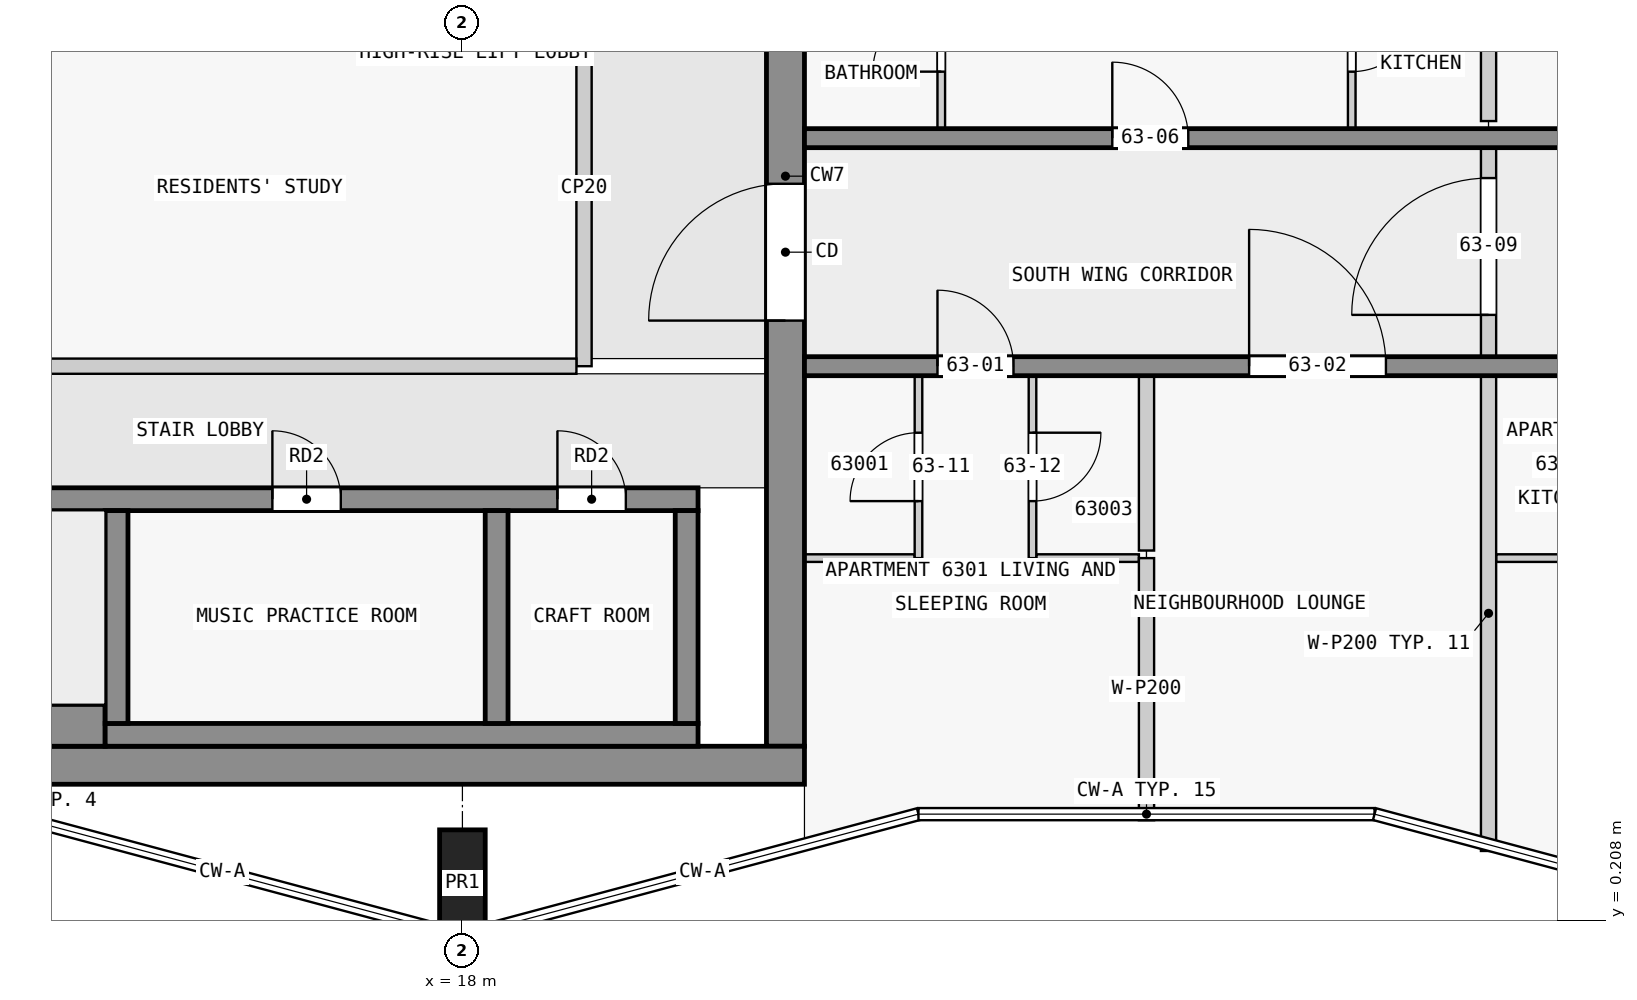
"""IFC4 building model, lengths in metres.
Left out: names, types, materials, properties, quantities, classifications, styles, units other than length and angle.
Written with IfcOpenShell. Run it as: python <this file> out.ifc"""

import sys

from ifc_helpers import new_model, si_unit, direction, frame, frame_2d, origin, origin_2d, place, context, subcontext, project, spatial, rectangle, extrude, element, fill, save


model = new_model("IFC4")
c1 = context("Model", 3, precision=1e-05, world=origin(), true_north=direction((0.0, 1.0)))
c2 = subcontext(c1, "Body", "Model", "MODEL_VIEW")
j1 = project(units=[si_unit("LENGTHUNIT", "METRE"), si_unit("PLANEANGLEUNIT", "RADIAN")], contexts=[c1])
p1 = place(None, origin())
s1 = spatial("IfcSite", under=j1, at=p1, CompositionType="ELEMENT")
p2 = place(p1, origin())
s2 = spatial("IfcBuilding", under=s1, at=p2, CompositionType="ELEMENT")
p3 = place(p2, frame((0.0, 0.0, 242.4)))
s3 = spatial("IfcBuildingStorey", under=s2, at=p3, CompositionType="ELEMENT", Elevation=242.4)
p4 = place(p3, frame((18.0, 0.7, 0.0), z_axis=(0.0, 0.0, 1.0), x_axis=(1.0, 0.0, 0.0)))
e1 = element("IfcColumn", 1, at=p4, inside=s3, PredefinedType="COLUMN", context=c2, shape_type="SweptSolid", body=[
    extrude(rectangle(XDim=0.6, YDim=1.4, at=origin_2d()), origin(), (0.0, 0.0, 1.0), 3.5),
])
p5 = place(p3, frame((1.8, 2.25, 0.0), z_axis=(0.0, 0.0, 1.0), x_axis=(1.0, 0.0, 0.0)))
e2 = element("IfcWall", 2, at=p5, inside=s3, PredefinedType="SHEAR", context=c2, shape_type="SweptSolid", body=[
    extrude(rectangle(XDim=20.7, YDim=0.5, at=frame_2d((10.35, 0.0))), origin(), (0.0, 0.0, 1.0), 3.25),
])
p6 = place(p3, frame((22.25, 2.5, 0.0), z_axis=(0.0, 0.0, 1.0), x_axis=(0.0, 1.0, 0.0)))
e3 = element("IfcWall", 3, at=p6, inside=s3, PredefinedType="SHEAR", context=c2, shape_type="SweptSolid", body=[
    extrude(rectangle(XDim=15.0, YDim=0.5, at=frame_2d((7.5, 0.0))), origin(), (0.0, 0.0, 1.0), 3.25),
])
p7 = place(p6, frame((5.6, 0.0, 0.0)))
e4 = element("IfcOpeningElement", 4, at=p7, cuts=e3, PredefinedType="OPENING", context=c2, shape_type="SweptSolid", body=[
    extrude(rectangle(XDim=1.8, YDim=2.1, at=frame_2d((0.9, 1.05))), frame((0.0, 0.26, 0.0), z_axis=(0.0, -1.0, 0.0), x_axis=(1.0, 0.0, 0.0)), (0.0, 0.0, 1.0), 0.52),
])
p8 = place(p3, frame((6.9, 2.775, 0.0), z_axis=(0.0, 0.0, 1.0), x_axis=(1.0, 0.0, 0.0)))
e5 = element("IfcWall", 5, at=p8, inside=s3, PredefinedType="SHEAR", context=c2, shape_type="SweptSolid", body=[
    extrude(rectangle(XDim=6.4, YDim=0.55, at=frame_2d((3.2, 0.0))), origin(), (0.0, 0.0, 1.0), 3.25),
])
p9 = place(p3, frame((13.3, 2.65, 0.0), z_axis=(0.0, 0.0, 1.0), x_axis=(1.0, 0.0, 0.0)))
e6 = element("IfcWall", 6, at=p9, inside=s3, PredefinedType="SHEAR", context=c2, shape_type="SweptSolid", body=[
    extrude(rectangle(XDim=7.8, YDim=0.3, at=frame_2d((3.9, 0.0))), origin(), (0.0, 0.0, 1.0), 3.25),
])
for number, where, z_axis, x_axis in (
    (7, (13.45, 2.8, 0.0), (0.0, 0.0, 1.0), (0.0, 1.0, 0.0)),
    (8, (18.45, 2.8, 0.0), (0.0, 0.0, 1.0), (0.0, 1.0, 0.0)),
    (9, (20.95, 2.8, 0.0), (0.0, 0.0, 1.0), (0.0, 1.0, 0.0)),
):
    element("IfcWall", number, at=place(p3, frame(where, z_axis=z_axis, x_axis=x_axis)), inside=s3, PredefinedType="SHEAR", context=c2, shape_type="SweptSolid", body=[
        extrude(rectangle(XDim=2.8, YDim=0.3, at=frame_2d((1.4, 0.0))), origin(), (0.0, 0.0, 1.0), 3.25),
    ])
p10 = place(p3, frame((2.3, 5.75, 0.0), z_axis=(0.0, 0.0, 1.0), x_axis=(1.0, 0.0, 0.0)))
e10 = element("IfcWall", 10, at=p10, inside=s3, PredefinedType="SHEAR", context=c2, shape_type="SweptSolid", body=[
    extrude(rectangle(XDim=18.8, YDim=0.3, at=frame_2d((9.4, 0.0))), origin(), (0.0, 0.0, 1.0), 3.25),
])
p11 = place(p10, frame((4.65, 0.0, 0.0)))
e11 = element("IfcOpeningElement", 11, at=p11, cuts=e10, PredefinedType="OPENING", context=c2, shape_type="SweptSolid", body=[
    extrude(rectangle(XDim=1.1, YDim=2.1, at=frame_2d((0.55, 1.05))), frame((0.0, 0.16, 0.0), z_axis=(0.0, -1.0, 0.0), x_axis=(1.0, 0.0, 0.0)), (0.0, 0.0, 1.0), 0.32),
])
p12 = place(p10, frame((0.45, 0.0, 0.0)))
e12 = element("IfcOpeningElement", 12, at=p12, cuts=e10, PredefinedType="OPENING", context=c2, shape_type="SweptSolid", body=[
    extrude(rectangle(XDim=1.1, YDim=2.1, at=frame_2d((0.55, 1.05))), frame((0.0, 0.16, 0.0), z_axis=(0.0, -1.0, 0.0), x_axis=(1.0, 0.0, 0.0)), (0.0, 0.0, 1.0), 0.32),
])
p13 = place(p10, frame((2.75, 0.0, 0.0)))
e13 = element("IfcOpeningElement", 13, at=p13, cuts=e10, PredefinedType="OPENING", context=c2, shape_type="SweptSolid", body=[
    extrude(rectangle(XDim=1.1, YDim=2.1, at=frame_2d((0.55, 1.05))), frame((0.0, 0.16, 0.0), z_axis=(0.0, -1.0, 0.0), x_axis=(1.0, 0.0, 0.0)), (0.0, 0.0, 1.0), 0.32),
])
p14 = place(p10, frame((13.2, 0.0, 0.0)))
e14 = element("IfcOpeningElement", 14, at=p14, cuts=e10, PredefinedType="OPENING", context=c2, shape_type="SweptSolid", body=[
    extrude(rectangle(XDim=0.9, YDim=2.1, at=frame_2d((0.45, 1.05))), frame((0.0, 0.16, 0.0), z_axis=(0.0, -1.0, 0.0), x_axis=(1.0, 0.0, 0.0)), (0.0, 0.0, 1.0), 0.32),
])
p15 = place(p10, frame((16.95, 0.0, 0.0)))
e15 = element("IfcOpeningElement", 15, at=p15, cuts=e10, PredefinedType="OPENING", context=c2, shape_type="SweptSolid", body=[
    extrude(rectangle(XDim=0.9, YDim=2.1, at=frame_2d((0.45, 1.05))), frame((0.0, 0.16, 0.0), z_axis=(0.0, -1.0, 0.0), x_axis=(1.0, 0.0, 0.0)), (0.0, 0.0, 1.0), 0.32),
])
p16 = place(p3, frame((22.5, 7.5, 0.0), z_axis=(0.0, 0.0, 1.0), x_axis=(1.0, 0.0, 0.0)))
e16 = element("IfcWall", 16, at=p16, inside=s3, PredefinedType="SHEAR", context=c2, shape_type="SweptSolid", body=[
    extrude(rectangle(XDim=22.5, YDim=0.25, at=frame_2d((11.25, 0.0))), origin(), (0.0, 0.0, 1.0), 3.25),
])
p17 = place(p16, frame((1.75, 0.0, 0.0)))
e17 = element("IfcOpeningElement", 17, at=p17, cuts=e16, PredefinedType="OPENING", context=c2, shape_type="SweptSolid", body=[
    extrude(rectangle(XDim=1.0, YDim=2.1, at=frame_2d((0.5, 1.05))), frame((0.0, 0.135, 0.0), z_axis=(0.0, -1.0, 0.0), x_axis=(1.0, 0.0, 0.0)), (0.0, 0.0, 1.0), 0.27),
])
p18 = place(p16, frame((5.85, 0.0, 0.0)))
e18 = element("IfcOpeningElement", 18, at=p18, cuts=e16, PredefinedType="OPENING", context=c2, shape_type="SweptSolid", body=[
    extrude(rectangle(XDim=1.8, YDim=2.1, at=frame_2d((0.9, 1.05))), frame((0.0, 0.135, 0.0), z_axis=(0.0, -1.0, 0.0), x_axis=(1.0, 0.0, 0.0)), (0.0, 0.0, 1.0), 0.27),
])
p19 = place(p16, frame((13.05, 0.0, 0.0)))
e19 = element("IfcOpeningElement", 19, at=p19, cuts=e16, PredefinedType="OPENING", context=c2, shape_type="SweptSolid", body=[
    extrude(rectangle(XDim=1.0, YDim=2.1, at=frame_2d((0.5, 1.05))), frame((0.0, 0.135, 0.0), z_axis=(0.0, -1.0, 0.0), x_axis=(1.0, 0.0, 0.0)), (0.0, 0.0, 1.0), 0.27),
])
p20 = place(p16, frame((18.75, 0.0, 0.0)))
e20 = element("IfcOpeningElement", 20, at=p20, cuts=e16, PredefinedType="OPENING", context=c2, shape_type="SweptSolid", body=[
    extrude(rectangle(XDim=0.9, YDim=2.1, at=frame_2d((0.45, 1.05))), frame((0.0, 0.135, 0.0), z_axis=(0.0, -1.0, 0.0), x_axis=(1.0, 0.0, 0.0)), (0.0, 0.0, 1.0), 0.27),
])
p21 = place(p16, frame((20.95, 0.0, 0.0)))
e21 = element("IfcOpeningElement", 21, at=p21, cuts=e16, PredefinedType="OPENING", context=c2, shape_type="SweptSolid", body=[
    extrude(rectangle(XDim=1.0, YDim=2.1, at=frame_2d((0.5, 1.05))), frame((0.0, 0.135, 0.0), z_axis=(0.0, -1.0, 0.0), x_axis=(1.0, 0.0, 0.0)), (0.0, 0.0, 1.0), 0.27),
])
p22 = place(p3, frame((22.5, 10.5, 0.0), z_axis=(0.0, 0.0, 1.0), x_axis=(1.0, 0.0, 0.0)))
e22 = element("IfcWall", 22, at=p22, inside=s3, PredefinedType="SHEAR", context=c2, shape_type="SweptSolid", body=[
    extrude(rectangle(XDim=22.5, YDim=0.25, at=frame_2d((11.25, 0.0))), origin(), (0.0, 0.0, 1.0), 3.25),
])
p23 = place(p22, frame((4.05, 0.0, 0.0)))
e23 = element("IfcOpeningElement", 23, at=p23, cuts=e22, PredefinedType="OPENING", context=c2, shape_type="SweptSolid", body=[
    extrude(rectangle(XDim=1.0, YDim=2.1, at=frame_2d((0.5, 1.05))), frame((0.0, 0.135, 0.0), z_axis=(0.0, -1.0, 0.0), x_axis=(1.0, 0.0, 0.0)), (0.0, 0.0, 1.0), 0.27),
])
p24 = place(p22, frame((10.75, 0.0, 0.0)))
e24 = element("IfcOpeningElement", 24, at=p24, cuts=e22, PredefinedType="OPENING", context=c2, shape_type="SweptSolid", body=[
    extrude(rectangle(XDim=1.0, YDim=2.1, at=frame_2d((0.5, 1.05))), frame((0.0, 0.135, 0.0), z_axis=(0.0, -1.0, 0.0), x_axis=(1.0, 0.0, 0.0)), (0.0, 0.0, 1.0), 0.27),
])
p25 = place(p22, frame((16.85, 0.0, 0.0)))
e25 = element("IfcOpeningElement", 25, at=p25, cuts=e22, PredefinedType="OPENING", context=c2, shape_type="SweptSolid", body=[
    extrude(rectangle(XDim=1.0, YDim=2.1, at=frame_2d((0.5, 1.05))), frame((0.0, 0.135, 0.0), z_axis=(0.0, -1.0, 0.0), x_axis=(1.0, 0.0, 0.0)), (0.0, 0.0, 1.0), 0.27),
])
p26 = place(p3, frame((10.9, 7.5, 0.0), z_axis=(0.0, 0.0, 1.0), x_axis=(1.0, 0.0, 0.0)))
e26 = element("IfcWall", 26, at=p26, inside=s3, PredefinedType="PARTITIONING", context=c2, shape_type="SweptSolid", body=[
    extrude(rectangle(XDim=8.6, YDim=0.2, at=frame_2d((4.3, 0.0))), origin(), (0.0, 0.0, 1.0), 3.25),
])
p27 = place(p3, frame((19.6, 7.5, 0.0), z_axis=(0.0, 0.0, 1.0), x_axis=(0.0, 1.0, 0.0)))
e27 = element("IfcWall", 27, at=p27, inside=s3, PredefinedType="PARTITIONING", context=c2, shape_type="SweptSolid", body=[
    extrude(rectangle(XDim=4.7, YDim=0.2, at=frame_2d((2.35, 0.0))), origin(), (0.0, 0.0, 1.0), 3.25),
])
p28 = place(p3, frame((22.5, 4.975, 0.0), z_axis=(0.0, 0.0, 1.0), x_axis=(1.0, 0.0, 0.0)))
e28 = element("IfcWall", 28, at=p28, inside=s3, PredefinedType="PARTITIONING", context=c2, shape_type="SweptSolid", body=[
    extrude(rectangle(XDim=1.45, YDim=0.1, at=frame_2d((0.725, 0.0))), origin(), (0.0, 0.0, 1.0), 3.25),
])
p29 = place(p3, frame((25.55, 4.975, 0.0), z_axis=(0.0, 0.0, 1.0), x_axis=(1.0, 0.0, 0.0)))
e29 = element("IfcWall", 29, at=p29, inside=s3, PredefinedType="PARTITIONING", context=c2, shape_type="SweptSolid", body=[
    extrude(rectangle(XDim=1.35, YDim=0.1, at=frame_2d((0.675, 0.0))), origin(), (0.0, 0.0, 1.0), 3.25),
])
p30 = place(p3, frame((31.6, 4.975, 0.0), z_axis=(0.0, 0.0, 1.0), x_axis=(1.0, 0.0, 0.0)))
e30 = element("IfcWall", 30, at=p30, inside=s3, PredefinedType="PARTITIONING", context=c2, shape_type="SweptSolid", body=[
    extrude(rectangle(XDim=1.65, YDim=0.1, at=frame_2d((0.825, 0.0))), origin(), (0.0, 0.0, 1.0), 3.25),
])
p31 = place(p3, frame((24.0, 4.975, 0.0), z_axis=(0.0, 0.0, 1.0), x_axis=(0.0, 1.0, 0.0)))
e31 = element("IfcWall", 31, at=p31, inside=s3, PredefinedType="PARTITIONING", context=c2, shape_type="SweptSolid", body=[
    extrude(rectangle(XDim=2.4, YDim=0.1, at=frame_2d((1.2, 0.0))), origin(), (0.0, 0.0, 1.0), 3.25),
])
p32 = place(p31, frame((0.75, 0.0, 0.0)))
e32 = element("IfcOpeningElement", 32, at=p32, cuts=e31, PredefinedType="OPENING", context=c2, shape_type="SweptSolid", body=[
    extrude(rectangle(XDim=0.9, YDim=2.1, at=frame_2d((0.45, 1.05))), frame((0.0, 0.06, 0.0), z_axis=(0.0, -1.0, 0.0), x_axis=(1.0, 0.0, 0.0)), (0.0, 0.0, 1.0), 0.12),
])
p33 = place(p3, frame((24.3, 10.625, 0.0), z_axis=(0.0, 0.0, 1.0), x_axis=(0.0, 1.0, 0.0)))
e33 = element("IfcWall", 33, at=p33, inside=s3, PredefinedType="PARTITIONING", context=c2, shape_type="SweptSolid", body=[
    extrude(rectangle(XDim=2.35, YDim=0.1, at=frame_2d((1.175, 0.0))), origin(), (0.0, 0.0, 1.0), 3.25),
])
p34 = place(p33, frame((0.75, 0.0, 0.0)))
e34 = element("IfcOpeningElement", 34, at=p34, cuts=e33, PredefinedType="OPENING", context=c2, shape_type="SweptSolid", body=[
    extrude(rectangle(XDim=0.9, YDim=2.1, at=frame_2d((0.45, 1.05))), frame((0.0, 0.06, 0.0), z_axis=(0.0, -1.0, 0.0), x_axis=(1.0, 0.0, 0.0)), (0.0, 0.0, 1.0), 0.12),
])
p35 = place(p3, frame((25.5, 7.375, 0.0), z_axis=(0.0, 0.0, 1.0), x_axis=(0.0, -1.0, 0.0)))
e35 = element("IfcWall", 35, at=p35, inside=s3, PredefinedType="PARTITIONING", context=c2, shape_type="SweptSolid", body=[
    extrude(rectangle(XDim=2.4, YDim=0.1, at=frame_2d((1.2, 0.0))), origin(), (0.0, 0.0, 1.0), 3.25),
])
p36 = place(p35, frame((0.75, 0.0, 0.0)))
e36 = element("IfcOpeningElement", 36, at=p36, cuts=e35, PredefinedType="OPENING", context=c2, shape_type="SweptSolid", body=[
    extrude(rectangle(XDim=0.9, YDim=2.1, at=frame_2d((0.45, 1.05))), frame((0.0, 0.06, 0.0), z_axis=(0.0, -1.0, 0.0), x_axis=(1.0, 0.0, 0.0)), (0.0, 0.0, 1.0), 0.12),
])
p37 = place(p3, frame((27.0, 4.975, 0.0), z_axis=(0.0, 0.0, 1.0), x_axis=(0.0, -1.0, 0.0)))
e37 = element("IfcWall", 37, at=p37, inside=s3, PredefinedType="PARTITIONING", context=c2, shape_type="SweptSolid", body=[
    extrude(rectangle(XDim=3.448, YDim=0.2, at=frame_2d((1.724, 0.0))), origin(), (0.0, 0.0, 1.0), 3.25),
])
p38 = place(p3, frame((27.0, 5.075, 0.0), z_axis=(0.0, 0.0, 1.0), x_axis=(0.0, 1.0, 0.0)))
e38 = element("IfcWall", 38, at=p38, inside=s3, PredefinedType="PARTITIONING", context=c2, shape_type="SweptSolid", body=[
    extrude(rectangle(XDim=2.3, YDim=0.2, at=frame_2d((1.15, 0.0))), origin(), (0.0, 0.0, 1.0), 3.25),
])
p39 = place(p3, frame((29.7, 13.025, 0.0), z_axis=(0.0, 0.0, 1.0), x_axis=(0.0, -1.0, 0.0)))
e39 = element("IfcWall", 39, at=p39, inside=s3, PredefinedType="PARTITIONING", context=c2, shape_type="SweptSolid", body=[
    extrude(rectangle(XDim=2.4, YDim=0.1, at=frame_2d((1.2, 0.0))), origin(), (0.0, 0.0, 1.0), 3.25),
])
p40 = place(p39, frame((0.75, 0.0, 0.0)))
e40 = element("IfcOpeningElement", 40, at=p40, cuts=e39, PredefinedType="OPENING", context=c2, shape_type="SweptSolid", body=[
    extrude(rectangle(XDim=0.9, YDim=2.1, at=frame_2d((0.45, 1.05))), frame((0.0, 0.06, 0.0), z_axis=(0.0, -1.0, 0.0), x_axis=(1.0, 0.0, 0.0)), (0.0, 0.0, 1.0), 0.12),
])
p41 = place(p3, frame((31.5, 1.122, 0.0), z_axis=(0.0, 0.0, 1.0), x_axis=(0.0, 1.0, 0.0)))
e41 = element("IfcWall", 41, at=p41, inside=s3, PredefinedType="PARTITIONING", context=c2, shape_type="SweptSolid", body=[
    extrude(rectangle(XDim=6.253, YDim=0.2, at=frame_2d((3.126, 0.0))), origin(), (0.0, 0.0, 1.0), 3.25),
])
p42 = place(p3, frame((31.5, 10.725, 0.0), z_axis=(0.0, 0.0, 1.0), x_axis=(0.0, 1.0, 0.0)))
e42 = element("IfcWall", 42, at=p42, inside=s3, PredefinedType="PARTITIONING", context=c2, shape_type="SweptSolid", body=[
    extrude(rectangle(XDim=2.2, YDim=0.2, at=frame_2d((1.1, 0.0))), origin(), (0.0, 0.0, 1.0), 3.25),
])
p43 = place(p3, frame((31.5, 7.475, 0.0), z_axis=(0.0, 0.0, 1.0), x_axis=(0.0, 1.0, 0.0)))
e43 = element("IfcWall", 43, at=p43, inside=s3, PredefinedType="PARTITIONING", context=c2, shape_type="SweptSolid", body=[
    extrude(rectangle(XDim=3.15, YDim=0.2, at=frame_2d((1.575, 0.0))), origin(), (0.0, 0.0, 1.0), 3.25),
])
p44 = place(p43, frame((0.7, 0.0, 0.0)))
e44 = element("IfcOpeningElement", 44, at=p44, cuts=e43, PredefinedType="OPENING", context=c2, shape_type="SweptSolid", body=[
    extrude(rectangle(XDim=1.8, YDim=2.1, at=frame_2d((0.9, 1.05))), frame((0.0, 0.11, 0.0), z_axis=(0.0, -1.0, 0.0), x_axis=(1.0, 0.0, 0.0)), (0.0, 0.0, 1.0), 0.22),
])
p45 = place(p7, origin())
e45 = element("IfcDoor", 45, at=p45, inside=s3, OperationType="DOUBLE_DOOR_SINGLE_SWING", PredefinedType="DOOR", context=c2, shape_type="SweptSolid", body=[
    extrude(rectangle(XDim=1.8, YDim=2.1, at=frame_2d((0.9, 1.05))), frame((0.0, 0.025, 0.0), z_axis=(0.0, -1.0, 0.0), x_axis=(1.0, 0.0, 0.0)), (0.0, 0.0, 1.0), 0.05),
])
fill(e4, e45)
p46 = place(p14, origin())
e46 = element("IfcDoor", 46, at=p46, inside=s3, OperationType="SINGLE_SWING_LEFT", PredefinedType="DOOR", context=c2, shape_type="SweptSolid", body=[
    extrude(rectangle(XDim=0.9, YDim=2.1, at=frame_2d((0.45, 1.05))), frame((0.0, 0.025, 0.0), z_axis=(0.0, -1.0, 0.0), x_axis=(1.0, 0.0, 0.0)), (0.0, 0.0, 1.0), 0.05),
])
fill(e14, e46)
p47 = place(p15, origin())
e47 = element("IfcDoor", 47, at=p47, inside=s3, OperationType="SINGLE_SWING_LEFT", PredefinedType="DOOR", context=c2, shape_type="SweptSolid", body=[
    extrude(rectangle(XDim=0.9, YDim=2.1, at=frame_2d((0.45, 1.05))), frame((0.0, 0.025, 0.0), z_axis=(0.0, -1.0, 0.0), x_axis=(1.0, 0.0, 0.0)), (0.0, 0.0, 1.0), 0.05),
])
fill(e15, e47)
p48 = place(p17, origin())
e48 = element("IfcDoor", 48, at=p48, inside=s3, OperationType="SINGLE_SWING_LEFT", PredefinedType="DOOR", context=c2, shape_type="SweptSolid", body=[
    extrude(rectangle(XDim=1.0, YDim=2.1, at=frame_2d((0.5, 1.05))), frame((0.0, 0.025, 0.0), z_axis=(0.0, -1.0, 0.0), x_axis=(1.0, 0.0, 0.0)), (0.0, 0.0, 1.0), 0.05),
])
fill(e17, e48)
p49 = place(p18, origin())
e49 = element("IfcDoor", 49, at=p49, inside=s3, OperationType="SINGLE_SWING_LEFT", PredefinedType="DOOR", context=c2, shape_type="SweptSolid", body=[
    extrude(rectangle(XDim=1.8, YDim=2.1, at=frame_2d((0.9, 1.05))), frame((0.0, 0.025, 0.0), z_axis=(0.0, -1.0, 0.0), x_axis=(1.0, 0.0, 0.0)), (0.0, 0.0, 1.0), 0.05),
])
fill(e18, e49)
p50 = place(p23, origin())
e50 = element("IfcDoor", 50, at=p50, inside=s3, OperationType="SINGLE_SWING_LEFT", PredefinedType="DOOR", context=c2, shape_type="SweptSolid", body=[
    extrude(rectangle(XDim=1.0, YDim=2.1, at=frame_2d((0.5, 1.05))), frame((0.0, 0.025, 0.0), z_axis=(0.0, -1.0, 0.0), x_axis=(1.0, 0.0, 0.0)), (0.0, 0.0, 1.0), 0.05),
])
fill(e23, e50)
p51 = place(p44, origin())
e51 = element("IfcDoor", 51, at=p51, inside=s3, OperationType="SINGLE_SWING_RIGHT", PredefinedType="DOOR", context=c2, shape_type="SweptSolid", body=[
    extrude(rectangle(XDim=1.8, YDim=2.1, at=frame_2d((0.9, 1.05))), frame((0.0, 0.025, 0.0), z_axis=(0.0, -1.0, 0.0), x_axis=(1.0, 0.0, 0.0)), (0.0, 0.0, 1.0), 0.05),
])
fill(e44, e51)
p52 = place(p32, origin())
e52 = element("IfcDoor", 52, at=p52, inside=s3, OperationType="SINGLE_SWING_LEFT", PredefinedType="DOOR", context=c2, shape_type="SweptSolid", body=[
    extrude(rectangle(XDim=0.9, YDim=2.1, at=frame_2d((0.45, 1.05))), frame((0.0, 0.025, 0.0), z_axis=(0.0, -1.0, 0.0), x_axis=(1.0, 0.0, 0.0)), (0.0, 0.0, 1.0), 0.05),
])
fill(e32, e52)
p53 = place(p36, origin())
e53 = element("IfcDoor", 53, at=p53, inside=s3, OperationType="SINGLE_SWING_LEFT", PredefinedType="DOOR", context=c2, shape_type="SweptSolid", body=[
    extrude(rectangle(XDim=0.9, YDim=2.1, at=frame_2d((0.45, 1.05))), frame((0.0, 0.025, 0.0), z_axis=(0.0, -1.0, 0.0), x_axis=(1.0, 0.0, 0.0)), (0.0, 0.0, 1.0), 0.05),
])
fill(e36, e53)
p54 = place(p34, origin())
e54 = element("IfcDoor", 54, at=p54, inside=s3, OperationType="SINGLE_SWING_RIGHT", PredefinedType="DOOR", context=c2, shape_type="SweptSolid", body=[
    extrude(rectangle(XDim=0.9, YDim=2.1, at=frame_2d((0.45, 1.05))), frame((0.0, 0.025, 0.0), z_axis=(0.0, -1.0, 0.0), x_axis=(1.0, 0.0, 0.0)), (0.0, 0.0, 1.0), 0.05),
])
fill(e34, e54)
p55 = place(p40, origin())
e55 = element("IfcDoor", 55, at=p55, inside=s3, OperationType="SINGLE_SWING_LEFT", PredefinedType="DOOR", context=c2, shape_type="SweptSolid", body=[
    extrude(rectangle(XDim=0.9, YDim=2.1, at=frame_2d((0.45, 1.05))), frame((0.0, 0.025, 0.0), z_axis=(0.0, -1.0, 0.0), x_axis=(1.0, 0.0, 0.0)), (0.0, 0.0, 1.0), 0.05),
])
fill(e40, e55)
save(model, sys.argv[1])
